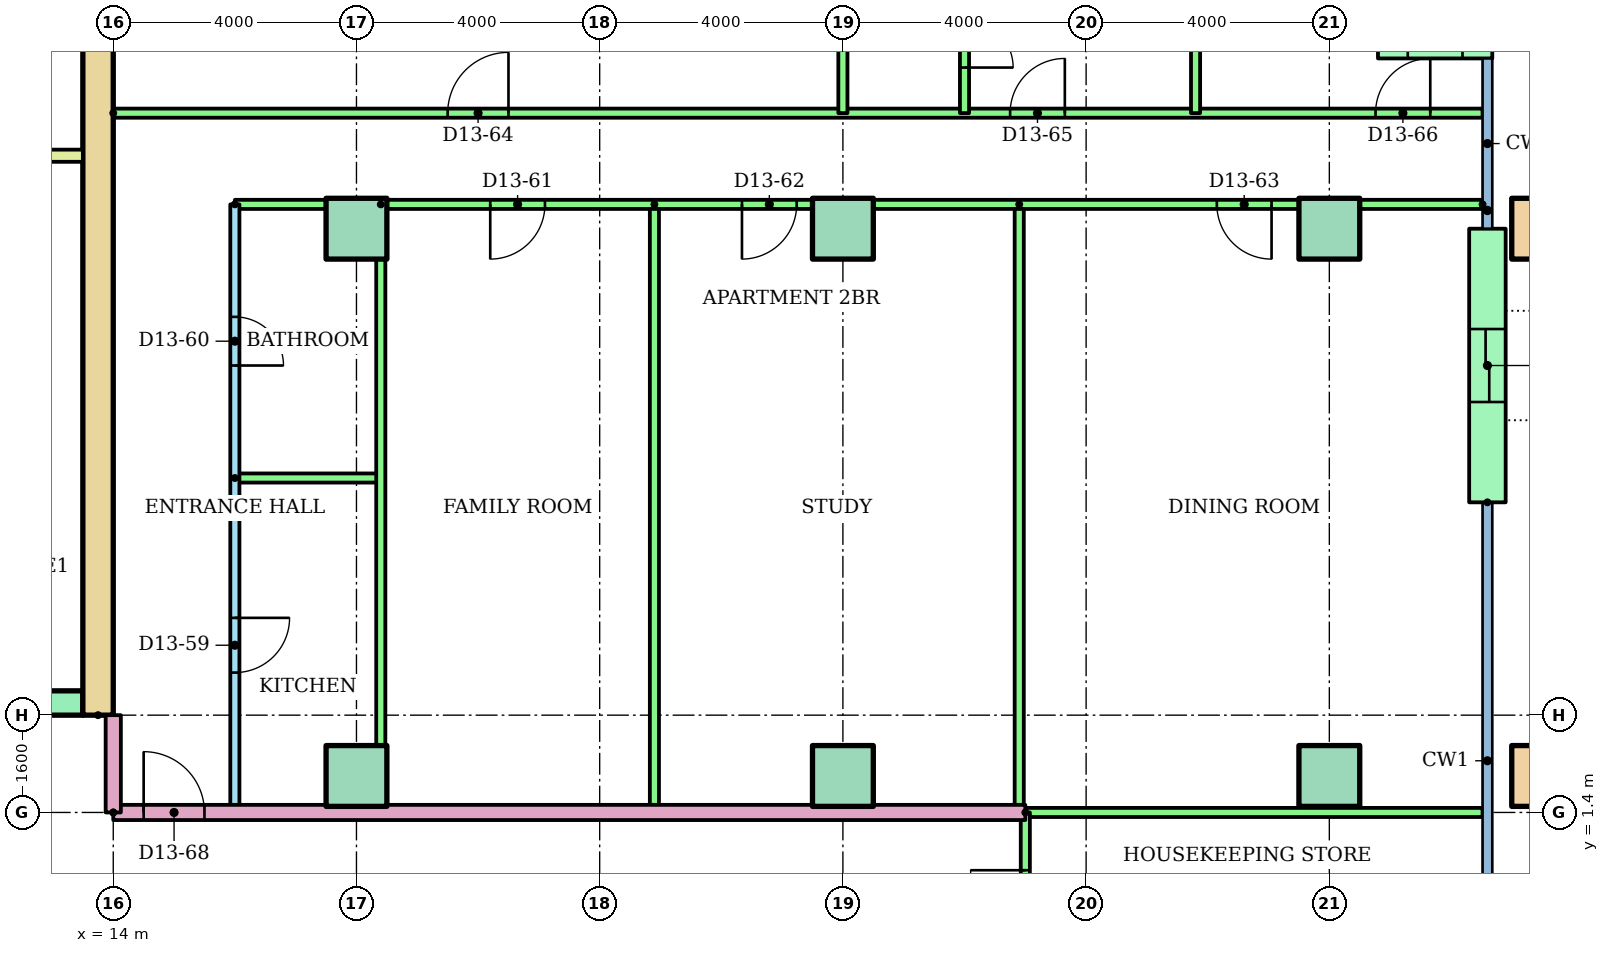
"""IFC4 building model, lengths in metres.
Left out: names, types, materials, properties, quantities, classifications, styles, units other than length and angle.
Written with IfcOpenShell. Run it as: python <this file> out.ifc"""

import sys

from ifc_helpers import new_model, si_unit, direction, frame, frame_2d, origin, origin_2d, place, context, subcontext, project, spatial, rectangle, hollow_rectangle, extrude, element, fill, save


model = new_model("IFC4")
c1 = context("Model", 3, precision=1e-05, world=origin(), true_north=direction((0.0, 1.0)))
c2 = subcontext(c1, "Body", "Model", "MODEL_VIEW")
j1 = project(units=[si_unit("LENGTHUNIT", "METRE"), si_unit("PLANEANGLEUNIT", "RADIAN")], contexts=[c1])
p1 = place(None, origin())
s1 = spatial("IfcSite", under=j1, at=p1, CompositionType="ELEMENT")
p2 = place(p1, origin())
s2 = spatial("IfcBuilding", under=s1, at=p2, CompositionType="ELEMENT")
p3 = place(p2, frame((0.0, 0.0, 51.2)))
s3 = spatial("IfcBuildingStorey", under=s2, at=p3, CompositionType="ELEMENT", Elevation=51.2)
for number, where in (
    (1, (18.0, 2.0, 0.0)),
    (2, (26.0, 2.0, 0.0)),
    (3, (34.0, 2.0, 0.0)),
):
    element("IfcColumn", number, at=place(p3, frame(where)), inside=s3, PredefinedType="COLUMN", context=c2, shape_type="SweptSolid", body=[
        extrude(rectangle(XDim=1.0, YDim=1.0, at=origin_2d()), origin(), (0.0, 0.0, 1.0), 3.2),
    ])
p4 = place(p3, frame((37.5, 2.0, 0.0)))
e4 = element("IfcColumn", 4, at=p4, inside=s3, PredefinedType="COLUMN", context=c2, shape_type="SweptSolid", body=[
    extrude(hollow_rectangle(XDim=1.0, YDim=1.0, WallThickness=0.05, at=origin_2d()), origin(), (0.0, 0.0, 1.0), 3.2),
])
for number, where in (
    (5, (18.0, 11.0, 0.0)),
    (6, (26.0, 11.0, 0.0)),
    (7, (34.0, 11.0, 0.0)),
):
    element("IfcColumn", number, at=place(p3, frame(where)), inside=s3, PredefinedType="COLUMN", context=c2, shape_type="SweptSolid", body=[
        extrude(rectangle(XDim=1.0, YDim=1.0, at=origin_2d()), origin(), (0.0, 0.0, 1.0), 3.2),
    ])
p5 = place(p3, frame((37.5, 11.0, 0.0)))
e8 = element("IfcColumn", 8, at=p5, inside=s3, PredefinedType="COLUMN", context=c2, shape_type="SweptSolid", body=[
    extrude(hollow_rectangle(XDim=1.0, YDim=1.0, WallThickness=0.05, at=origin_2d()), origin(), (0.0, 0.0, 1.0), 3.2),
])
p6 = place(p3, frame((36.68, 14.1, 0.0), z_axis=(0.0, 0.0, 1.0), x_axis=(-1.0, 0.0, 0.0)))
e9 = element("IfcWall", 9, at=p6, inside=s3, PredefinedType="STANDARD", context=c2, shape_type="SweptSolid", body=[
    extrude(rectangle(XDim=1.88, YDim=0.6, at=frame_2d((0.94, 0.0))), origin(), (0.0, 0.0, 1.0), 2.92),
])
p7 = place(p6, frame((0.49, 0.0, 0.9)))
e10 = element("IfcOpeningElement", 10, at=p7, cuts=e9, PredefinedType="OPENING", context=c2, shape_type="SweptSolid", body=[
    extrude(rectangle(XDim=0.9, YDim=1.5, at=frame_2d((0.45, 0.75))), frame((0.0, 0.31, 0.0), z_axis=(0.0, -1.0, 0.0), x_axis=(1.0, 0.0, 0.0)), (0.0, 0.0, 1.0), 0.62),
])
p8 = place(p3, frame((36.6, 6.5, 0.0), z_axis=(0.0, 0.0, 1.0), x_axis=(0.0, 1.0, 0.0)))
e11 = element("IfcWall", 11, at=p8, inside=s3, PredefinedType="STANDARD", context=c2, shape_type="SweptSolid", body=[
    extrude(rectangle(XDim=4.5, YDim=0.6, at=frame_2d((2.25, 0.0))), origin(), (0.0, 0.0, 1.0), 2.92),
])
p9 = place(p8, frame((1.65, 0.0, 0.0)))
e12 = element("IfcOpeningElement", 12, at=p9, cuts=e11, PredefinedType="OPENING", context=c2, shape_type="SweptSolid", body=[
    extrude(rectangle(XDim=1.2, YDim=2.1, at=frame_2d((0.6, 1.05))), frame((0.0, 0.31, 0.0), z_axis=(0.0, -1.0, 0.0), x_axis=(1.0, 0.0, 0.0)), (0.0, 0.0, 1.0), 0.62),
])
p10 = place(p3, frame((13.75, 3.0, 0.0), z_axis=(0.0, 0.0, 1.0), x_axis=(0.0, 1.0, 0.0)))
e13 = element("IfcWall", 13, at=p10, inside=s3, PredefinedType="SHEAR", context=c2, shape_type="SweptSolid", body=[
    extrude(rectangle(XDim=17.0, YDim=0.5, at=frame_2d((8.5, 0.0))), origin(), (0.0, 0.0, 1.0), 2.92),
])
p11 = place(p3, frame((-13.5, 3.2, 0.0)))
e14 = element("IfcWall", 14, at=p11, inside=s3, PredefinedType="SHEAR", context=c2, shape_type="SweptSolid", body=[
    extrude(rectangle(XDim=27.0, YDim=0.4, at=frame_2d((13.5, 0.0))), origin(), (0.0, 0.0, 1.0), 2.92),
])
p12 = place(p11, frame((6.861, 0.0, 0.0)))
e15 = element("IfcOpeningElement", 15, at=p12, cuts=e14, PredefinedType="OPENING", context=c2, shape_type="SweptSolid", body=[
    extrude(rectangle(XDim=1.1, YDim=2.1, at=frame_2d((0.55, 1.05))), frame((0.0, 0.21, 0.0), z_axis=(0.0, -1.0, 0.0), x_axis=(1.0, 0.0, 0.0)), (0.0, 0.0, 1.0), 0.42),
])
p13 = place(p11, frame((9.906, 0.0, 0.0)))
e16 = element("IfcOpeningElement", 16, at=p13, cuts=e14, PredefinedType="OPENING", context=c2, shape_type="SweptSolid", body=[
    extrude(rectangle(XDim=1.1, YDim=2.1, at=frame_2d((0.55, 1.05))), frame((0.0, 0.21, 0.0), z_axis=(0.0, -1.0, 0.0), x_axis=(1.0, 0.0, 0.0)), (0.0, 0.0, 1.0), 0.42),
])
p14 = place(p11, frame((15.994, 0.0, 0.0)))
e17 = element("IfcOpeningElement", 17, at=p14, cuts=e14, PredefinedType="OPENING", context=c2, shape_type="SweptSolid", body=[
    extrude(rectangle(XDim=1.1, YDim=2.1, at=frame_2d((0.55, 1.05))), frame((0.0, 0.21, 0.0), z_axis=(0.0, -1.0, 0.0), x_axis=(1.0, 0.0, 0.0)), (0.0, 0.0, 1.0), 0.42),
])
p15 = place(p11, frame((19.039, 0.0, 0.0)))
e18 = element("IfcOpeningElement", 18, at=p15, cuts=e14, PredefinedType="OPENING", context=c2, shape_type="SweptSolid", body=[
    extrude(rectangle(XDim=1.1, YDim=2.1, at=frame_2d((0.55, 1.05))), frame((0.0, 0.21, 0.0), z_axis=(0.0, -1.0, 0.0), x_axis=(1.0, 0.0, 0.0)), (0.0, 0.0, 1.0), 0.42),
])
p16 = place(p11, frame((12.6, 0.0, 0.0)))
e19 = element("IfcOpeningElement", 19, at=p16, cuts=e14, PredefinedType="OPENING", context=c2, shape_type="SweptSolid", body=[
    extrude(rectangle(XDim=1.8, YDim=2.1, at=frame_2d((0.9, 1.05))), frame((0.0, 0.21, 0.0), z_axis=(0.0, -1.0, 0.0), x_axis=(1.0, 0.0, 0.0)), (0.0, 0.0, 1.0), 0.42),
])
p17 = place(p3, frame((9.6, 12.2, 0.0)))
e20 = element("IfcWall", 20, at=p17, inside=s3, PredefinedType="PARTITIONING", context=c2, shape_type="SweptSolid", body=[
    extrude(rectangle(XDim=3.9, YDim=0.2, at=frame_2d((1.95, 0.0))), origin(), (0.0, 0.0, 1.0), 2.92),
])
p18 = place(p3, frame((16.0, 11.4, 0.0), z_axis=(0.0, 0.0, 1.0), x_axis=(0.0, -1.0, 0.0)))
e21 = element("IfcWall", 21, at=p18, inside=s3, PredefinedType="PARTITIONING", context=c2, shape_type="SweptSolid", body=[
    extrude(rectangle(XDim=10.0, YDim=0.15, at=frame_2d((5.0, 0.0))), origin(), (0.0, 0.0, 1.0), 2.4),
])
p19 = place(p18, frame((6.8, 0.0, 0.0)))
e22 = element("IfcOpeningElement", 22, at=p19, cuts=e21, PredefinedType="OPENING", context=c2, shape_type="SweptSolid", body=[
    extrude(rectangle(XDim=0.9, YDim=2.1, at=frame_2d((0.45, 1.05))), frame((0.0, 0.085, 0.0), z_axis=(0.0, -1.0, 0.0), x_axis=(1.0, 0.0, 0.0)), (0.0, 0.0, 1.0), 0.17),
])
p20 = place(p18, frame((1.85, 0.0, 0.0)))
e23 = element("IfcOpeningElement", 23, at=p20, cuts=e21, PredefinedType="OPENING", context=c2, shape_type="SweptSolid", body=[
    extrude(rectangle(XDim=0.8, YDim=2.1, at=frame_2d((0.4, 1.05))), frame((0.0, 0.085, 0.0), z_axis=(0.0, -1.0, 0.0), x_axis=(1.0, 0.0, 0.0)), (0.0, 0.0, 1.0), 0.17),
])
p21 = place(p3, frame((16.0, 6.9, 0.0)))
e24 = element("IfcWall", 24, at=p21, inside=s3, PredefinedType="PARTITIONING", context=c2, shape_type="SweptSolid", body=[
    extrude(rectangle(XDim=2.4, YDim=0.15, at=frame_2d((1.2, 0.0))), origin(), (0.0, 0.0, 1.0), 2.4),
])
for number, where, z_axis, x_axis in (
    (25, (18.4, 11.4, 0.0), (0.0, 0.0, 1.0), (0.0, -1.0, 0.0)),
    (26, (22.9, 11.4, 0.0), (0.0, 0.0, 1.0), (0.0, -1.0, 0.0)),
    (27, (28.9, 11.4, 0.0), (0.0, 0.0, 1.0), (0.0, -1.0, 0.0)),
):
    element("IfcWall", number, at=place(p3, frame(where, z_axis=z_axis, x_axis=x_axis)), inside=s3, PredefinedType="PARTITIONING", context=c2, shape_type="SweptSolid", body=[
        extrude(rectangle(XDim=10.0, YDim=0.15, at=frame_2d((5.0, 0.0))), origin(), (0.0, 0.0, 1.0), 2.4),
    ])
p22 = place(p3, frame((36.52, 11.4, 0.0), z_axis=(0.0, 0.0, 1.0), x_axis=(-1.0, 0.0, 0.0)))
e28 = element("IfcWall", 28, at=p22, inside=s3, PredefinedType="PARTITIONING", context=c2, shape_type="SweptSolid", body=[
    extrude(rectangle(XDim=20.52, YDim=0.15, at=frame_2d((10.26, 0.0))), origin(), (0.0, 0.0, 1.0), 2.4),
])
p23 = place(p22, frame((15.42, 0.0, 0.0)))
e29 = element("IfcOpeningElement", 29, at=p23, cuts=e28, PredefinedType="OPENING", context=c2, shape_type="SweptSolid", body=[
    extrude(rectangle(XDim=0.9, YDim=2.1, at=frame_2d((0.45, 1.05))), frame((0.0, 0.085, 0.0), z_axis=(0.0, -1.0, 0.0), x_axis=(1.0, 0.0, 0.0)), (0.0, 0.0, 1.0), 0.17),
])
p24 = place(p22, frame((11.28, 0.0, 0.0)))
e30 = element("IfcOpeningElement", 30, at=p24, cuts=e28, PredefinedType="OPENING", context=c2, shape_type="SweptSolid", body=[
    extrude(rectangle(XDim=0.9, YDim=2.1, at=frame_2d((0.45, 1.05))), frame((0.0, 0.085, 0.0), z_axis=(0.0, -1.0, 0.0), x_axis=(1.0, 0.0, 0.0)), (0.0, 0.0, 1.0), 0.17),
])
p25 = place(p22, frame((3.47, 0.0, 0.0)))
e31 = element("IfcOpeningElement", 31, at=p25, cuts=e28, PredefinedType="OPENING", context=c2, shape_type="SweptSolid", body=[
    extrude(rectangle(XDim=0.9, YDim=2.1, at=frame_2d((0.45, 1.05))), frame((0.0, 0.085, 0.0), z_axis=(0.0, -1.0, 0.0), x_axis=(1.0, 0.0, 0.0)), (0.0, 0.0, 1.0), 0.17),
])
p26 = place(p3, frame((14.0, 12.9, 0.0)))
e32 = element("IfcWall", 32, at=p26, inside=s3, PredefinedType="PARTITIONING", context=c2, shape_type="SweptSolid", body=[
    extrude(rectangle(XDim=22.52, YDim=0.15, at=frame_2d((11.26, 0.0))), origin(), (0.0, 0.0, 1.0), 2.4),
])
p27 = place(p26, frame((5.5, 0.0, 0.0)))
e33 = element("IfcOpeningElement", 33, at=p27, cuts=e32, PredefinedType="OPENING", context=c2, shape_type="SweptSolid", body=[
    extrude(rectangle(XDim=1.0, YDim=2.1, at=frame_2d((0.5, 1.05))), frame((0.0, 0.085, 0.0), z_axis=(0.0, -1.0, 0.0), x_axis=(1.0, 0.0, 0.0)), (0.0, 0.0, 1.0), 0.17),
])
p28 = place(p26, frame((14.75, 0.0, 0.0)))
e34 = element("IfcOpeningElement", 34, at=p28, cuts=e32, PredefinedType="OPENING", context=c2, shape_type="SweptSolid", body=[
    extrude(rectangle(XDim=0.9, YDim=2.1, at=frame_2d((0.45, 1.05))), frame((0.0, 0.085, 0.0), z_axis=(0.0, -1.0, 0.0), x_axis=(1.0, 0.0, 0.0)), (0.0, 0.0, 1.0), 0.17),
])
p29 = place(p26, frame((20.76, 0.0, 0.0)))
e35 = element("IfcOpeningElement", 35, at=p29, cuts=e32, PredefinedType="OPENING", context=c2, shape_type="SweptSolid", body=[
    extrude(rectangle(XDim=0.9, YDim=2.1, at=frame_2d((0.45, 1.05))), frame((0.0, 0.085, 0.0), z_axis=(0.0, -1.0, 0.0), x_axis=(1.0, 0.0, 0.0)), (0.0, 0.0, 1.0), 0.17),
])
p30 = place(p3, frame((26.0, 18.521, 0.0), z_axis=(0.0, 0.0, 1.0), x_axis=(0.0, -1.0, 0.0)))
e36 = element("IfcWall", 36, at=p30, inside=s3, PredefinedType="PARTITIONING", context=c2, shape_type="SweptSolid", body=[
    extrude(rectangle(XDim=5.621, YDim=0.15, at=frame_2d((2.811, 0.0))), origin(), (0.0, 0.0, 1.0), 2.4),
])
p31 = place(p3, frame((31.8, 16.72, 0.0), z_axis=(0.0, 0.0, 1.0), x_axis=(0.0, -1.0, 0.0)))
e37 = element("IfcWall", 37, at=p31, inside=s3, PredefinedType="PARTITIONING", context=c2, shape_type="SweptSolid", body=[
    extrude(rectangle(XDim=3.82, YDim=0.15, at=frame_2d((1.91, 0.0))), origin(), (0.0, 0.0, 1.0), 2.4),
])
p32 = place(p3, frame((28.0, 15.2, 0.0), z_axis=(0.0, 0.0, 1.0), x_axis=(0.0, -1.0, 0.0)))
e38 = element("IfcWall", 38, at=p32, inside=s3, PredefinedType="PARTITIONING", context=c2, shape_type="SweptSolid", body=[
    extrude(rectangle(XDim=2.3, YDim=0.15, at=frame_2d((1.15, 0.0))), origin(), (0.0, 0.0, 1.0), 2.4),
])
p33 = place(p32, frame((0.75, 0.0, 0.0)))
e39 = element("IfcOpeningElement", 39, at=p33, cuts=e38, PredefinedType="OPENING", context=c2, shape_type="SweptSolid", body=[
    extrude(rectangle(XDim=0.8, YDim=2.1, at=frame_2d((0.4, 1.05))), frame((0.0, 0.085, 0.0), z_axis=(0.0, -1.0, 0.0), x_axis=(1.0, 0.0, 0.0)), (0.0, 0.0, 1.0), 0.17),
])
p34 = place(p3, frame((14.0, 1.4, 0.0)))
e40 = element("IfcWall", 40, at=p34, inside=s3, PredefinedType="PARTITIONING", context=c2, shape_type="SweptSolid", body=[
    extrude(rectangle(XDim=15.0, YDim=0.25, at=frame_2d((7.5, 0.0))), origin(), (0.0, 0.0, 1.0), 2.4),
])
p35 = place(p34, frame((0.5, 0.0, 0.0)))
e41 = element("IfcOpeningElement", 41, at=p35, cuts=e40, PredefinedType="OPENING", context=c2, shape_type="SweptSolid", body=[
    extrude(rectangle(XDim=1.0, YDim=2.1, at=frame_2d((0.5, 1.05))), frame((0.0, 0.135, 0.0), z_axis=(0.0, -1.0, 0.0), x_axis=(1.0, 0.0, 0.0)), (0.0, 0.0, 1.0), 0.27),
])
p36 = place(p3, frame((29.0, 1.4, 0.0)))
e42 = element("IfcWall", 42, at=p36, inside=s3, PredefinedType="PARTITIONING", context=c2, shape_type="SweptSolid", body=[
    extrude(rectangle(XDim=7.52, YDim=0.15, at=frame_2d((3.76, 0.0))), origin(), (0.0, 0.0, 1.0), 2.4),
])
p37 = place(p3, frame((29.0, -1.4, 0.0), z_axis=(0.0, 0.0, 1.0), x_axis=(0.0, 1.0, 0.0)))
e43 = element("IfcWall", 43, at=p37, inside=s3, PredefinedType="PARTITIONING", context=c2, shape_type="SweptSolid", body=[
    extrude(rectangle(XDim=2.8, YDim=0.15, at=frame_2d((1.4, 0.0))), origin(), (0.0, 0.0, 1.0), 2.4),
])
p38 = place(p37, frame((0.95, 0.0, 0.0)))
e44 = element("IfcOpeningElement", 44, at=p38, cuts=e43, PredefinedType="OPENING", context=c2, shape_type="SweptSolid", body=[
    extrude(rectangle(XDim=0.9, YDim=2.1, at=frame_2d((0.45, 1.05))), frame((0.0, 0.085, 0.0), z_axis=(0.0, -1.0, 0.0), x_axis=(1.0, 0.0, 0.0)), (0.0, 0.0, 1.0), 0.17),
])
p39 = place(p3, frame((14.0, 1.4, 0.0), z_axis=(0.0, 0.0, 1.0), x_axis=(0.0, 1.0, 0.0)))
e45 = element("IfcWall", 45, at=p39, inside=s3, PredefinedType="PARTITIONING", context=c2, shape_type="SweptSolid", body=[
    extrude(rectangle(XDim=1.6, YDim=0.25, at=frame_2d((0.8, 0.0))), origin(), (0.0, 0.0, 1.0), 2.4),
])
p40 = place(p19, origin())
e46 = element("IfcDoor", 46, at=p40, inside=s3, OperationType="SINGLE_SWING_LEFT", PredefinedType="DOOR", context=c2, shape_type="SweptSolid", body=[
    extrude(rectangle(XDim=0.9, YDim=2.1, at=frame_2d((0.45, 1.05))), frame((0.0, 0.025, 0.0), z_axis=(0.0, -1.0, 0.0), x_axis=(1.0, 0.0, 0.0)), (0.0, 0.0, 1.0), 0.05),
])
fill(e22, e46)
p41 = place(p20, origin())
e47 = element("IfcDoor", 47, at=p41, inside=s3, OperationType="SINGLE_SWING_RIGHT", PredefinedType="DOOR", context=c2, shape_type="SweptSolid", body=[
    extrude(rectangle(XDim=0.8, YDim=2.1, at=frame_2d((0.4, 1.05))), frame((0.0, 0.025, 0.0), z_axis=(0.0, -1.0, 0.0), x_axis=(1.0, 0.0, 0.0)), (0.0, 0.0, 1.0), 0.05),
])
fill(e23, e47)
p42 = place(p23, origin())
e48 = element("IfcDoor", 48, at=p42, inside=s3, OperationType="SINGLE_SWING_RIGHT", PredefinedType="DOOR", context=c2, shape_type="SweptSolid", body=[
    extrude(rectangle(XDim=0.9, YDim=2.1, at=frame_2d((0.45, 1.05))), frame((0.0, 0.025, 0.0), z_axis=(0.0, -1.0, 0.0), x_axis=(1.0, 0.0, 0.0)), (0.0, 0.0, 1.0), 0.05),
])
fill(e29, e48)
p43 = place(p24, origin())
e49 = element("IfcDoor", 49, at=p43, inside=s3, OperationType="SINGLE_SWING_RIGHT", PredefinedType="DOOR", context=c2, shape_type="SweptSolid", body=[
    extrude(rectangle(XDim=0.9, YDim=2.1, at=frame_2d((0.45, 1.05))), frame((0.0, 0.025, 0.0), z_axis=(0.0, -1.0, 0.0), x_axis=(1.0, 0.0, 0.0)), (0.0, 0.0, 1.0), 0.05),
])
fill(e30, e49)
p44 = place(p25, origin())
e50 = element("IfcDoor", 50, at=p44, inside=s3, OperationType="SINGLE_SWING_LEFT", PredefinedType="DOOR", context=c2, shape_type="SweptSolid", body=[
    extrude(rectangle(XDim=0.9, YDim=2.1, at=frame_2d((0.45, 1.05))), frame((0.0, 0.025, 0.0), z_axis=(0.0, -1.0, 0.0), x_axis=(1.0, 0.0, 0.0)), (0.0, 0.0, 1.0), 0.05),
])
fill(e31, e50)
p45 = place(p27, origin())
e51 = element("IfcDoor", 51, at=p45, inside=s3, OperationType="SINGLE_SWING_RIGHT", PredefinedType="DOOR", context=c2, shape_type="SweptSolid", body=[
    extrude(rectangle(XDim=1.0, YDim=2.1, at=frame_2d((0.5, 1.05))), frame((0.0, 0.025, 0.0), z_axis=(0.0, -1.0, 0.0), x_axis=(1.0, 0.0, 0.0)), (0.0, 0.0, 1.0), 0.05),
])
fill(e33, e51)
p46 = place(p28, origin())
e52 = element("IfcDoor", 52, at=p46, inside=s3, OperationType="SINGLE_SWING_RIGHT", PredefinedType="DOOR", context=c2, shape_type="SweptSolid", body=[
    extrude(rectangle(XDim=0.9, YDim=2.1, at=frame_2d((0.45, 1.05))), frame((0.0, 0.025, 0.0), z_axis=(0.0, -1.0, 0.0), x_axis=(1.0, 0.0, 0.0)), (0.0, 0.0, 1.0), 0.05),
])
fill(e34, e52)
p47 = place(p29, origin())
e53 = element("IfcDoor", 53, at=p47, inside=s3, OperationType="SINGLE_SWING_RIGHT", PredefinedType="DOOR", context=c2, shape_type="SweptSolid", body=[
    extrude(rectangle(XDim=0.9, YDim=2.1, at=frame_2d((0.45, 1.05))), frame((0.0, 0.025, 0.0), z_axis=(0.0, -1.0, 0.0), x_axis=(1.0, 0.0, 0.0)), (0.0, 0.0, 1.0), 0.05),
])
fill(e35, e53)
p48 = place(p33, origin())
e54 = element("IfcDoor", 54, at=p48, inside=s3, OperationType="SINGLE_SWING_RIGHT", PredefinedType="DOOR", context=c2, shape_type="SweptSolid", body=[
    extrude(rectangle(XDim=0.8, YDim=2.1, at=frame_2d((0.4, 1.05))), frame((0.0, 0.025, 0.0), z_axis=(0.0, -1.0, 0.0), x_axis=(1.0, 0.0, 0.0)), (0.0, 0.0, 1.0), 0.05),
])
fill(e39, e54)
p49 = place(p35, origin())
e55 = element("IfcDoor", 55, at=p49, inside=s3, OperationType="SINGLE_SWING_LEFT", PredefinedType="DOOR", context=c2, shape_type="SweptSolid", body=[
    extrude(rectangle(XDim=1.0, YDim=2.1, at=frame_2d((0.5, 1.05))), frame((0.0, 0.025, 0.0), z_axis=(0.0, -1.0, 0.0), x_axis=(1.0, 0.0, 0.0)), (0.0, 0.0, 1.0), 0.05),
])
fill(e41, e55)
p50 = place(p38, origin())
e56 = element("IfcDoor", 56, at=p50, inside=s3, OperationType="SINGLE_SWING_RIGHT", PredefinedType="DOOR", context=c2, shape_type="SweptSolid", body=[
    extrude(rectangle(XDim=0.9, YDim=2.1, at=frame_2d((0.45, 1.05))), frame((0.0, 0.025, 0.0), z_axis=(0.0, -1.0, 0.0), x_axis=(1.0, 0.0, 0.0)), (0.0, 0.0, 1.0), 0.05),
])
fill(e44, e56)
p51 = place(p9, origin())
e57 = element("IfcDoor", 57, at=p51, inside=s3, OperationType="SLIDING_TO_LEFT", PredefinedType="DOOR", context=c2, shape_type="SweptSolid", body=[
    extrude(rectangle(XDim=1.2, YDim=2.1, at=frame_2d((0.6, 1.05))), frame((0.0, 0.025, 0.0), z_axis=(0.0, -1.0, 0.0), x_axis=(1.0, 0.0, 0.0)), (0.0, 0.0, 1.0), 0.05),
])
fill(e12, e57)
save(model, sys.argv[1])
